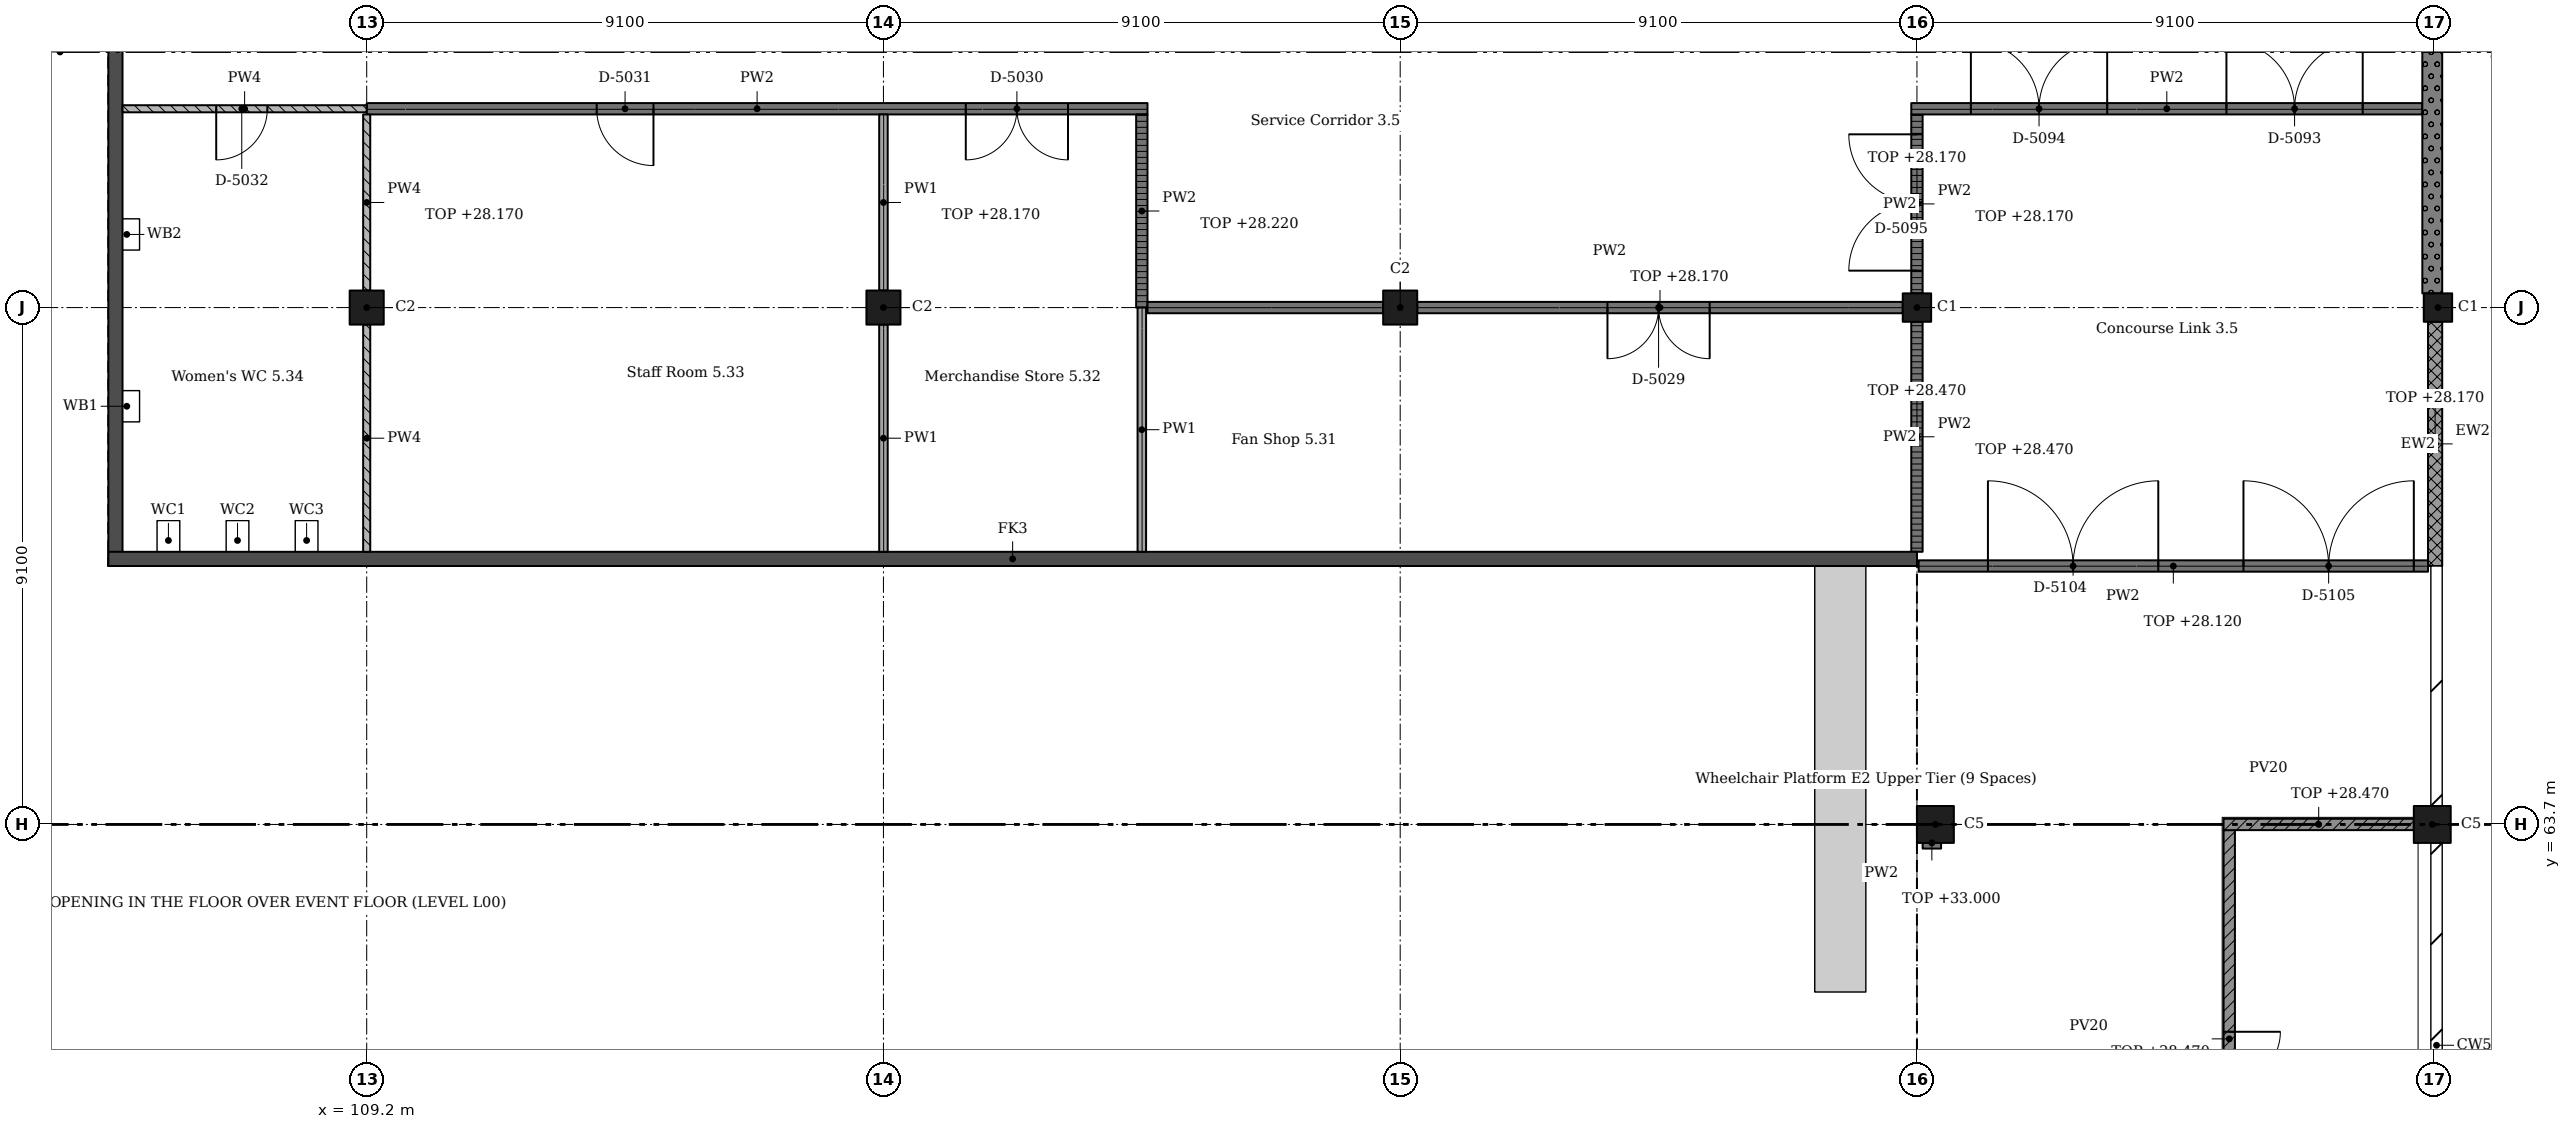
"""IFC4 building model, lengths in metres.
Left out: names, types, materials, properties, quantities, classifications, styles, units other than length and angle.
Written with IfcOpenShell. Run it as: python <this file> out.ifc"""

import sys

from ifc_helpers import new_model, si_unit, direction, frame, frame_2d, origin, origin_2d, place, context, subcontext, project, spatial, rectangle, extrude, element, fill, save


model = new_model("IFC4")
c1 = context("Model", 3, precision=1e-05, world=origin(), true_north=direction((0.0, 1.0)))
c2 = subcontext(c1, "Body", "Model", "MODEL_VIEW")
j1 = project(units=[si_unit("LENGTHUNIT", "METRE"), si_unit("PLANEANGLEUNIT", "RADIAN")], contexts=[c1])
p1 = place(None, origin())
s1 = spatial("IfcSite", under=j1, at=p1, CompositionType="ELEMENT")
p2 = place(p1, origin())
s2 = spatial("IfcBuilding", under=s1, at=p2, CompositionType="ELEMENT")
p3 = place(p2, frame((0.0, 0.0, 24.57)))
s3 = spatial("IfcBuildingStorey", under=s2, at=p3, CompositionType="ELEMENT", Elevation=24.57)
for number, where, z_axis, x_axis in (
    (1, (109.2, 72.8, 0.0), (0.0, 0.0, 1.0), (1.0, 0.0, 0.0)),
    (2, (118.3, 72.8, 0.0), (0.0, 0.0, 1.0), (1.0, 0.0, 0.0)),
    (3, (127.4, 72.8, 0.0), (0.0, 0.0, 1.0), (1.0, 0.0, 0.0)),
):
    element("IfcColumn", number, at=place(p3, frame(where, z_axis=z_axis, x_axis=x_axis)), inside=s3, PredefinedType="COLUMN", context=c2, shape_type="SweptSolid", body=[
        extrude(rectangle(XDim=0.6, YDim=0.6, at=origin_2d()), origin(), (0.0, 0.0, 1.0), 4.55),
    ])
p4 = place(p3, frame((136.825, 63.7, 0.0), z_axis=(0.0, 0.0, 1.0), x_axis=(1.0, 0.0, 0.0)))
e4 = element("IfcColumn", 4, at=p4, inside=s3, PredefinedType="COLUMN", context=c2, shape_type="SweptSolid", body=[
    extrude(rectangle(XDim=0.65, YDim=0.65, at=origin_2d()), origin(), (0.0, 0.0, 1.0), 4.55),
])
p5 = place(p3, frame((136.5, 72.8, 0.0), z_axis=(0.0, 0.0, 1.0), x_axis=(1.0, 0.0, 0.0)))
e5 = element("IfcColumn", 5, at=p5, inside=s3, PredefinedType="COLUMN", context=c2, shape_type="SweptSolid", body=[
    extrude(rectangle(XDim=0.5, YDim=0.5, at=origin_2d()), origin(), (0.0, 0.0, 1.0), 4.55),
])
p6 = place(p3, frame((145.575, 63.7, 0.0), z_axis=(0.0, 0.0, 1.0), x_axis=(1.0, 0.0, 0.0)))
e6 = element("IfcColumn", 6, at=p6, inside=s3, PredefinedType="COLUMN", context=c2, shape_type="SweptSolid", body=[
    extrude(rectangle(XDim=0.65, YDim=0.65, at=origin_2d()), origin(), (0.0, 0.0, 1.0), 4.55),
])
p7 = place(p3, frame((145.675, 72.8, 0.0), z_axis=(0.0, 0.0, 1.0), x_axis=(1.0, 0.0, 0.0)))
e7 = element("IfcColumn", 7, at=p7, inside=s3, PredefinedType="COLUMN", context=c2, shape_type="SweptSolid", body=[
    extrude(rectangle(XDim=0.5, YDim=0.5, at=origin_2d()), origin(), (0.0, 0.0, 1.0), 4.55),
])
for number, where, z_axis, x_axis in (
    (8, (104.775, 68.25, 0.0), (0.0, 0.0, 1.0), (0.0, 1.0, 0.0)),
    (9, (104.65, 68.375, 0.0), (0.0, 0.0, 1.0), (1.0, 0.0, 0.0)),
):
    element("IfcWall", number, at=place(p3, frame(where, z_axis=z_axis, x_axis=x_axis)), inside=s3, PredefinedType="SHEAR", context=c2, shape_type="SweptSolid", body=[
        extrude(rectangle(XDim=31.85, YDim=0.25, at=frame_2d((15.925, 0.0))), origin(), (0.0, 0.0, 1.0), 4.55),
    ])
p8 = place(p3, frame((145.625, 68.25, 0.0), z_axis=(0.0, 0.0, 1.0), x_axis=(0.0, 1.0, 0.0)))
e10 = element("IfcWall", 10, at=p8, inside=s3, PredefinedType="SOLIDWALL", context=c2, shape_type="SweptSolid", body=[
    extrude(rectangle(XDim=4.3, YDim=0.25, at=frame_2d((2.15, 0.0))), origin(), (0.0, 0.0, 1.0), 3.6),
])
p9 = place(p3, frame((145.575, 73.05, 0.0), z_axis=(0.0, 0.0, 1.0), x_axis=(0.0, 1.0, 0.0)))
e11 = element("IfcWall", 11, at=p9, inside=s3, PredefinedType="SOLIDWALL", context=c2, shape_type="SweptSolid", body=[
    extrude(rectangle(XDim=8.6, YDim=0.35, at=frame_2d((4.3, 0.0))), origin(), (0.0, 0.0, 1.0), 3.6),
])
p10 = place(p3, frame((104.9, 76.3, 0.0), z_axis=(0.0, 0.0, 1.0), x_axis=(1.0, 0.0, 0.0)))
e12 = element("IfcWall", 12, at=p10, inside=s3, PredefinedType="PARTITIONING", context=c2, shape_type="SweptSolid", body=[
    extrude(rectangle(XDim=4.3, YDim=0.125, at=frame_2d((2.15, 0.0))), origin(), (0.0, 0.0, 1.0), 4.35),
])
p11 = place(p10, frame((1.65, 0.0, 0.0)))
e13 = element("IfcOpeningElement", 13, at=p11, cuts=e12, PredefinedType="OPENING", context=c2, shape_type="SweptSolid", body=[
    extrude(rectangle(XDim=0.9, YDim=2.1, at=frame_2d((0.45, 1.05))), frame((0.0, 0.073, 0.0), z_axis=(0.0, -1.0, 0.0), x_axis=(1.0, 0.0, 0.0)), (0.0, 0.0, 1.0), 0.145),
])
p12 = place(p3, frame((109.2, 68.5, 0.0), z_axis=(0.0, 0.0, 1.0), x_axis=(0.0, 1.0, 0.0)))
e14 = element("IfcWall", 14, at=p12, inside=s3, PredefinedType="PARTITIONING", context=c2, shape_type="SweptSolid", body=[
    extrude(rectangle(XDim=4.0, YDim=0.125, at=frame_2d((2.0, 0.0))), origin(), (0.0, 0.0, 1.0), 4.35),
])
p13 = place(p3, frame((109.2, 73.1, 0.0), z_axis=(0.0, 0.0, 1.0), x_axis=(0.0, 1.0, 0.0)))
e15 = element("IfcWall", 15, at=p13, inside=s3, PredefinedType="PARTITIONING", context=c2, shape_type="SweptSolid", body=[
    extrude(rectangle(XDim=3.1, YDim=0.125, at=frame_2d((1.55, 0.0))), origin(), (0.0, 0.0, 1.0), 3.6),
])
p14 = place(p3, frame((109.2, 76.3, 0.0), z_axis=(0.0, 0.0, 1.0), x_axis=(1.0, 0.0, 0.0)))
e16 = element("IfcWall", 16, at=p14, inside=s3, PredefinedType="PARTITIONING", context=c2, shape_type="SweptSolid", body=[
    extrude(rectangle(XDim=13.75, YDim=0.2, at=frame_2d((6.875, 0.0))), origin(), (0.0, 0.0, 1.0), 4.35),
])
p15 = place(p14, frame((10.55, 0.0, 0.0)))
e17 = element("IfcOpeningElement", 17, at=p15, cuts=e16, PredefinedType="OPENING", context=c2, shape_type="SweptSolid", body=[
    extrude(rectangle(XDim=1.8, YDim=2.1, at=frame_2d((0.9, 1.05))), frame((0.0, 0.11, 0.0), z_axis=(0.0, -1.0, 0.0), x_axis=(1.0, 0.0, 0.0)), (0.0, 0.0, 1.0), 0.22),
])
p16 = place(p14, frame((4.05, 0.0, 0.0)))
e18 = element("IfcOpeningElement", 18, at=p16, cuts=e16, PredefinedType="OPENING", context=c2, shape_type="SweptSolid", body=[
    extrude(rectangle(XDim=1.0, YDim=2.1, at=frame_2d((0.5, 1.05))), frame((0.0, 0.11, 0.0), z_axis=(0.0, -1.0, 0.0), x_axis=(1.0, 0.0, 0.0)), (0.0, 0.0, 1.0), 0.22),
])
p17 = place(p3, frame((118.3, 68.5, 0.0), z_axis=(0.0, 0.0, 1.0), x_axis=(0.0, 1.0, 0.0)))
e19 = element("IfcWall", 19, at=p17, inside=s3, PredefinedType="PARTITIONING", context=c2, shape_type="SweptSolid", body=[
    extrude(rectangle(XDim=4.0, YDim=0.15, at=frame_2d((2.0, 0.0))), origin(), (0.0, 0.0, 1.0), 4.35),
])
p18 = place(p3, frame((118.3, 73.1, 0.0), z_axis=(0.0, 0.0, 1.0), x_axis=(0.0, 1.0, 0.0)))
e20 = element("IfcWall", 20, at=p18, inside=s3, PredefinedType="PARTITIONING", context=c2, shape_type="SweptSolid", body=[
    extrude(rectangle(XDim=3.1, YDim=0.15, at=frame_2d((1.55, 0.0))), origin(), (0.0, 0.0, 1.0), 3.6),
])
p19 = place(p3, frame((122.85, 68.5, 0.0), z_axis=(0.0, 0.0, 1.0), x_axis=(0.0, 1.0, 0.0)))
e21 = element("IfcWall", 21, at=p19, inside=s3, PredefinedType="PARTITIONING", context=c2, shape_type="SweptSolid", body=[
    extrude(rectangle(XDim=4.3, YDim=0.15, at=frame_2d((2.15, 0.0))), origin(), (0.0, 0.0, 1.0), 4.35),
])
p20 = place(p3, frame((122.85, 76.2, 0.0), z_axis=(0.0, 0.0, 1.0), x_axis=(0.0, -1.0, 0.0)))
e22 = element("IfcWall", 22, at=p20, inside=s3, PredefinedType="PARTITIONING", context=c2, shape_type="SweptSolid", body=[
    extrude(rectangle(XDim=3.4, YDim=0.2, at=frame_2d((1.7, 0.0))), origin(), (0.0, 0.0, 1.0), 3.65),
])
p21 = place(p3, frame((122.95, 72.8, 0.0), z_axis=(0.0, 0.0, 1.0), x_axis=(1.0, 0.0, 0.0)))
e23 = element("IfcWall", 23, at=p21, inside=s3, PredefinedType="PARTITIONING", context=c2, shape_type="SweptSolid", body=[
    extrude(rectangle(XDim=4.15, YDim=0.2, at=frame_2d((2.075, 0.0))), origin(), (0.0, 0.0, 1.0), 3.6),
])
p22 = place(p3, frame((127.7, 72.8, 0.0), z_axis=(0.0, 0.0, 1.0), x_axis=(1.0, 0.0, 0.0)))
e24 = element("IfcWall", 24, at=p22, inside=s3, PredefinedType="PARTITIONING", context=c2, shape_type="SweptSolid", body=[
    extrude(rectangle(XDim=8.55, YDim=0.2, at=frame_2d((4.275, 0.0))), origin(), (0.0, 0.0, 1.0), 3.6),
])
p23 = place(p22, frame((3.35, 0.0, 0.0)))
e25 = element("IfcOpeningElement", 25, at=p23, cuts=e24, PredefinedType="OPENING", context=c2, shape_type="SweptSolid", body=[
    extrude(rectangle(XDim=1.8, YDim=2.1, at=frame_2d((0.9, 1.05))), frame((0.0, 0.11, 0.0), z_axis=(0.0, -1.0, 0.0), x_axis=(1.0, 0.0, 0.0)), (0.0, 0.0, 1.0), 0.22),
])
p24 = place(p3, frame((136.5, 72.55, 0.0), z_axis=(0.0, 0.0, 1.0), x_axis=(0.0, -1.0, 0.0)))
e26 = element("IfcWall", 26, at=p24, inside=s3, PredefinedType="PARTITIONING", context=c2, shape_type="SweptSolid", body=[
    extrude(rectangle(XDim=4.05, YDim=0.2, at=frame_2d((2.025, 0.0))), origin(), (0.0, 0.0, 1.0), 3.9),
])
p25 = place(p3, frame((136.5, 76.2, 0.0), z_axis=(0.0, 0.0, 1.0), x_axis=(0.0, -1.0, 0.0)))
e27 = element("IfcWall", 27, at=p25, inside=s3, PredefinedType="PARTITIONING", context=c2, shape_type="SweptSolid", body=[
    extrude(rectangle(XDim=3.15, YDim=0.2, at=frame_2d((1.575, 0.0))), origin(), (0.0, 0.0, 1.0), 3.6),
])
p26 = place(p25, frame((0.35, 0.0, 0.0)))
e28 = element("IfcOpeningElement", 28, at=p26, cuts=e27, PredefinedType="OPENING", context=c2, shape_type="SweptSolid", body=[
    extrude(rectangle(XDim=2.4, YDim=2.4, at=frame_2d((1.2, 1.2))), frame((0.0, 0.11, 0.0), z_axis=(0.0, -1.0, 0.0), x_axis=(1.0, 0.0, 0.0)), (0.0, 0.0, 1.0), 0.22),
])
p27 = place(p3, frame((136.6, 63.375, 0.0), z_axis=(0.0, 0.0, 1.0), x_axis=(1.0, 0.0, 0.0)))
e29 = element("IfcWall", 29, at=p27, inside=s3, PredefinedType="PARTITIONING", context=c2, shape_type="SweptSolid", body=[
    extrude(rectangle(XDim=0.325, YDim=0.2, at=frame_2d((0.163, 0.0))), origin(), (0.0, 0.0, 1.0), 8.43),
])
p28 = place(p3, frame((142.0, 63.6, 0.0), z_axis=(0.0, 0.0, 1.0), x_axis=(0.0, -1.0, 0.0)))
e30 = element("IfcWall", 30, at=p28, inside=s3, PredefinedType="PARTITIONING", context=c2, shape_type="SweptSolid", body=[
    extrude(rectangle(XDim=9.0, YDim=0.2, at=frame_2d((4.5, 0.0))), origin(), (0.0, 0.0, 1.0), 3.9),
])
p29 = place(p28, frame((3.55, 0.0, 0.0)))
e31 = element("IfcOpeningElement", 31, at=p29, cuts=e30, PredefinedType="OPENING", context=c2, shape_type="SweptSolid", body=[
    extrude(rectangle(XDim=1.8, YDim=2.1, at=frame_2d((0.9, 1.05))), frame((0.0, 0.11, 0.0), z_axis=(0.0, -1.0, 0.0), x_axis=(1.0, 0.0, 0.0)), (0.0, 0.0, 1.0), 0.22),
])
p30 = place(p3, frame((136.53, 68.25, 0.0), z_axis=(0.0, 0.0, 1.0), x_axis=(1.0, 0.0, 0.0)))
e32 = element("IfcWall", 32, at=p30, inside=s3, PredefinedType="PARTITIONING", context=c2, shape_type="SweptSolid", body=[
    extrude(rectangle(XDim=8.97, YDim=0.2, at=frame_2d((4.485, 0.0))), origin(), (0.0, 0.0, 1.0), 3.55),
])
p31 = place(p30, frame((1.22, 0.0, 0.0)))
e33 = element("IfcOpeningElement", 33, at=p31, cuts=e32, PredefinedType="OPENING", context=c2, shape_type="SweptSolid", body=[
    extrude(rectangle(XDim=3.0, YDim=2.4, at=frame_2d((1.5, 1.2))), frame((0.0, 0.11, 0.0), z_axis=(0.0, -1.0, 0.0), x_axis=(1.0, 0.0, 0.0)), (0.0, 0.0, 1.0), 0.22),
])
p32 = place(p30, frame((5.72, 0.0, 0.0)))
e34 = element("IfcOpeningElement", 34, at=p32, cuts=e32, PredefinedType="OPENING", context=c2, shape_type="SweptSolid", body=[
    extrude(rectangle(XDim=3.0, YDim=2.4, at=frame_2d((1.5, 1.2))), frame((0.0, 0.11, 0.0), z_axis=(0.0, -1.0, 0.0), x_axis=(1.0, 0.0, 0.0)), (0.0, 0.0, 1.0), 0.22),
])
p33 = place(p3, frame((145.25, 63.7, 0.0), z_axis=(0.0, 0.0, 1.0), x_axis=(-1.0, 0.0, 0.0)))
e35 = element("IfcWall", 35, at=p33, inside=s3, PredefinedType="PARTITIONING", context=c2, shape_type="SweptSolid", body=[
    extrude(rectangle(XDim=3.35, YDim=0.2, at=frame_2d((1.675, 0.0))), origin(), (0.0, 0.0, 1.0), 3.9),
])
p34 = place(p3, frame((145.4, 76.3, 0.0), z_axis=(0.0, 0.0, 1.0), x_axis=(-1.0, 0.0, 0.0)))
e36 = element("IfcWall", 36, at=p34, inside=s3, PredefinedType="PARTITIONING", context=c2, shape_type="SweptSolid", body=[
    extrude(rectangle(XDim=9.0, YDim=0.2, at=frame_2d((4.5, 0.0))), origin(), (0.0, 0.0, 1.0), 4.35),
])
p35 = place(p34, frame((1.05, 0.0, 0.0)))
e37 = element("IfcOpeningElement", 37, at=p35, cuts=e36, PredefinedType="OPENING", context=c2, shape_type="SweptSolid", body=[
    extrude(rectangle(XDim=2.4, YDim=2.4, at=frame_2d((1.2, 1.2))), frame((0.0, 0.11, 0.0), z_axis=(0.0, -1.0, 0.0), x_axis=(1.0, 0.0, 0.0)), (0.0, 0.0, 1.0), 0.22),
])
p36 = place(p34, frame((5.55, 0.0, 0.0)))
e38 = element("IfcOpeningElement", 38, at=p36, cuts=e36, PredefinedType="OPENING", context=c2, shape_type="SweptSolid", body=[
    extrude(rectangle(XDim=2.4, YDim=2.4, at=frame_2d((1.2, 1.2))), frame((0.0, 0.11, 0.0), z_axis=(0.0, -1.0, 0.0), x_axis=(1.0, 0.0, 0.0)), (0.0, 0.0, 1.0), 0.22),
])
p37 = place(p23, origin())
e39 = element("IfcDoor", 39, at=p37, inside=s3, OperationType="DOUBLE_DOOR_SINGLE_SWING", PredefinedType="DOOR", context=c2, shape_type="SweptSolid", body=[
    extrude(rectangle(XDim=1.8, YDim=2.1, at=frame_2d((0.9, 1.05))), frame((0.0, 0.025, 0.0), z_axis=(0.0, -1.0, 0.0), x_axis=(1.0, 0.0, 0.0)), (0.0, 0.0, 1.0), 0.05),
])
fill(e25, e39)
p38 = place(p15, origin())
e40 = element("IfcDoor", 40, at=p38, inside=s3, OperationType="DOUBLE_DOOR_SINGLE_SWING", PredefinedType="DOOR", context=c2, shape_type="SweptSolid", body=[
    extrude(rectangle(XDim=1.8, YDim=2.1, at=frame_2d((0.9, 1.05))), frame((0.0, 0.025, 0.0), z_axis=(0.0, -1.0, 0.0), x_axis=(1.0, 0.0, 0.0)), (0.0, 0.0, 1.0), 0.05),
])
fill(e17, e40)
p39 = place(p16, origin())
e41 = element("IfcDoor", 41, at=p39, inside=s3, OperationType="SINGLE_SWING_RIGHT", PredefinedType="DOOR", context=c2, shape_type="SweptSolid", body=[
    extrude(rectangle(XDim=1.0, YDim=2.1, at=frame_2d((0.5, 1.05))), frame((0.0, 0.025, 0.0), z_axis=(0.0, -1.0, 0.0), x_axis=(1.0, 0.0, 0.0)), (0.0, 0.0, 1.0), 0.05),
])
fill(e18, e41)
p40 = place(p11, origin())
e42 = element("IfcDoor", 42, at=p40, inside=s3, OperationType="SINGLE_SWING_LEFT", PredefinedType="DOOR", context=c2, shape_type="SweptSolid", body=[
    extrude(rectangle(XDim=0.9, YDim=2.1, at=frame_2d((0.45, 1.05))), frame((0.0, 0.025, 0.0), z_axis=(0.0, -1.0, 0.0), x_axis=(1.0, 0.0, 0.0)), (0.0, 0.0, 1.0), 0.05),
])
fill(e13, e42)
p41 = place(p29, origin())
e43 = element("IfcDoor", 43, at=p41, inside=s3, OperationType="DOUBLE_DOOR_SINGLE_SWING", PredefinedType="DOOR", context=c2, shape_type="SweptSolid", body=[
    extrude(rectangle(XDim=1.8, YDim=2.1, at=frame_2d((0.9, 1.05))), frame((0.0, 0.025, 0.0), z_axis=(0.0, -1.0, 0.0), x_axis=(1.0, 0.0, 0.0)), (0.0, 0.0, 1.0), 0.05),
])
fill(e31, e43)
p42 = place(p35, origin())
e44 = element("IfcDoor", 44, at=p42, inside=s3, OperationType="DOUBLE_DOOR_SINGLE_SWING", PredefinedType="DOOR", context=c2, shape_type="SweptSolid", body=[
    extrude(rectangle(XDim=2.4, YDim=2.4, at=frame_2d((1.2, 1.2))), frame((0.0, 0.025, 0.0), z_axis=(0.0, -1.0, 0.0), x_axis=(1.0, 0.0, 0.0)), (0.0, 0.0, 1.0), 0.05),
])
fill(e37, e44)
p43 = place(p36, origin())
e45 = element("IfcDoor", 45, at=p43, inside=s3, OperationType="DOUBLE_DOOR_SINGLE_SWING", PredefinedType="DOOR", context=c2, shape_type="SweptSolid", body=[
    extrude(rectangle(XDim=2.4, YDim=2.4, at=frame_2d((1.2, 1.2))), frame((0.0, 0.025, 0.0), z_axis=(0.0, -1.0, 0.0), x_axis=(1.0, 0.0, 0.0)), (0.0, 0.0, 1.0), 0.05),
])
fill(e38, e45)
p44 = place(p26, origin())
e46 = element("IfcDoor", 46, at=p44, inside=s3, OperationType="DOUBLE_DOOR_SINGLE_SWING", PredefinedType="DOOR", context=c2, shape_type="SweptSolid", body=[
    extrude(rectangle(XDim=2.4, YDim=2.4, at=frame_2d((1.2, 1.2))), frame((0.0, 0.025, 0.0), z_axis=(0.0, -1.0, 0.0), x_axis=(1.0, 0.0, 0.0)), (0.0, 0.0, 1.0), 0.05),
])
fill(e28, e46)
p45 = place(p31, origin())
e47 = element("IfcDoor", 47, at=p45, inside=s3, OperationType="DOUBLE_DOOR_SINGLE_SWING", PredefinedType="DOOR", context=c2, shape_type="SweptSolid", body=[
    extrude(rectangle(XDim=3.0, YDim=2.4, at=frame_2d((1.5, 1.2))), frame((0.0, 0.025, 0.0), z_axis=(0.0, -1.0, 0.0), x_axis=(1.0, 0.0, 0.0)), (0.0, 0.0, 1.0), 0.05),
])
fill(e33, e47)
p46 = place(p32, origin())
e48 = element("IfcDoor", 48, at=p46, inside=s3, OperationType="DOUBLE_DOOR_SINGLE_SWING", PredefinedType="DOOR", context=c2, shape_type="SweptSolid", body=[
    extrude(rectangle(XDim=3.0, YDim=2.4, at=frame_2d((1.5, 1.2))), frame((0.0, 0.025, 0.0), z_axis=(0.0, -1.0, 0.0), x_axis=(1.0, 0.0, 0.0)), (0.0, 0.0, 1.0), 0.05),
])
fill(e34, e48)
save(model, sys.argv[1])
